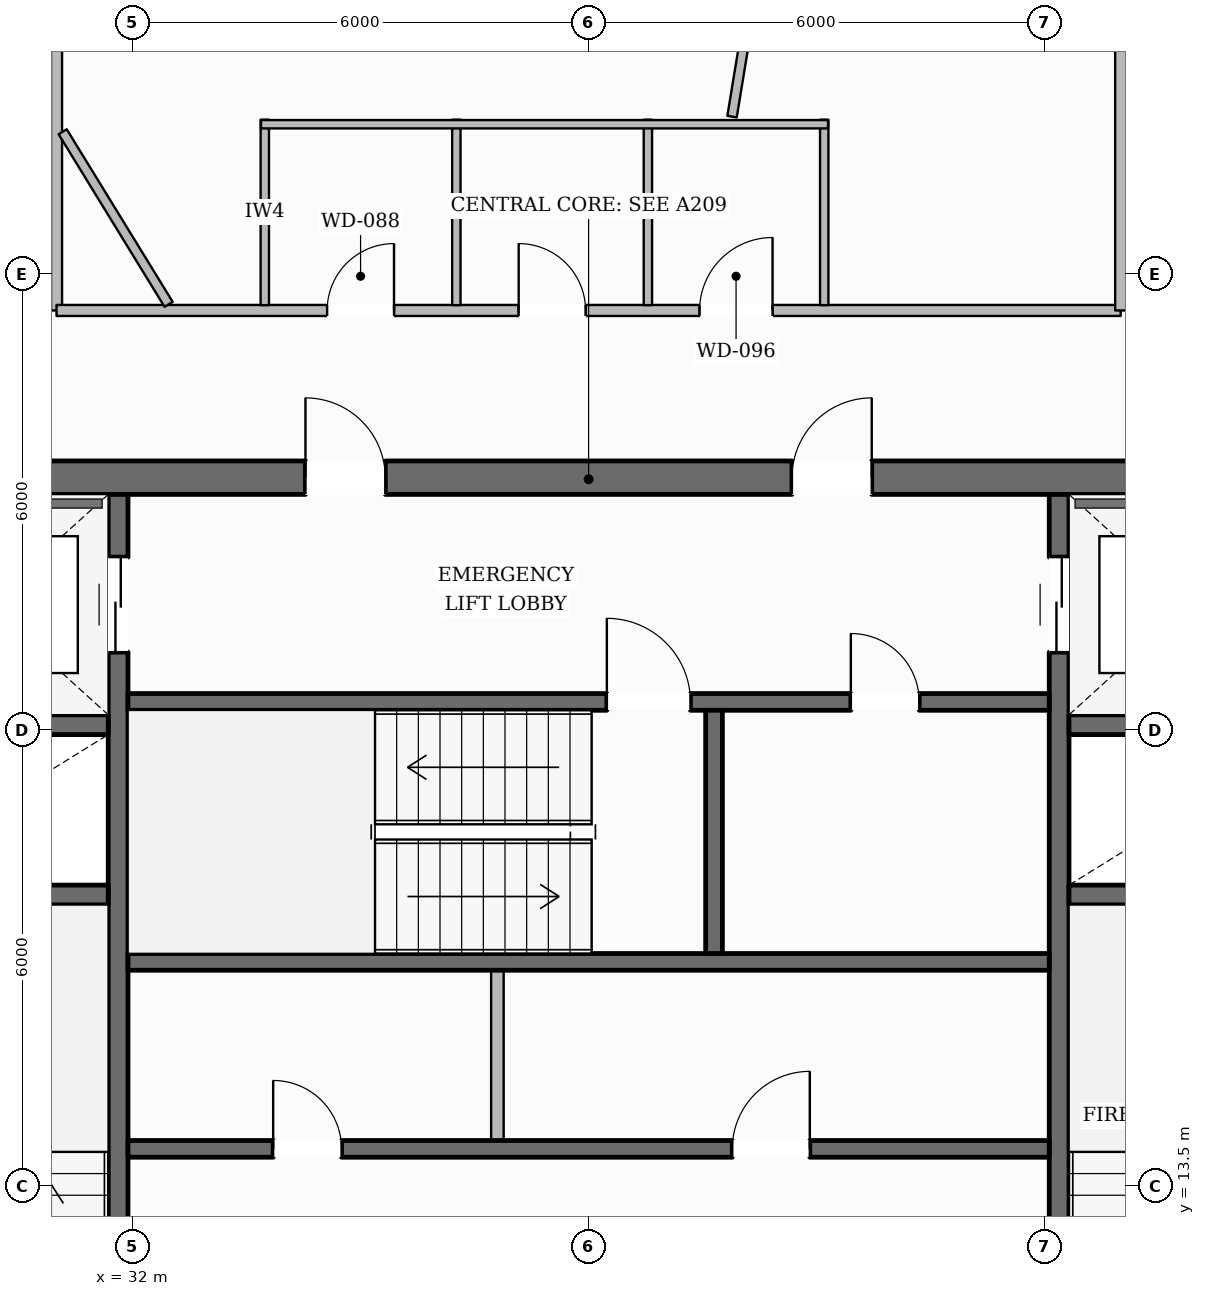
"""IFC4 building model, lengths in metres.
Left out: names, types, materials, properties, quantities, classifications, styles, units other than length and angle.
Written with IfcOpenShell. Run it as: python <this file> out.ifc"""

import sys

from ifc_helpers import new_model, si_unit, direction, frame, frame_2d, origin, place, context, subcontext, project, spatial, rectangle, extrude, element, fill, save


model = new_model("IFC4")
c1 = context("Model", 3, precision=1e-05, world=origin(), true_north=direction((0.0, 1.0)))
c2 = subcontext(c1, "Body", "Model", "MODEL_VIEW")
j1 = project(units=[si_unit("LENGTHUNIT", "METRE"), si_unit("PLANEANGLEUNIT", "RADIAN")], contexts=[c1])
p1 = place(None, origin())
s1 = spatial("IfcSite", under=j1, at=p1, CompositionType="ELEMENT")
p2 = place(p1, origin())
s2 = spatial("IfcBuilding", under=s1, at=p2, CompositionType="ELEMENT")
p3 = place(p2, frame((0.0, 0.0, 191.95)))
s3 = spatial("IfcBuildingStorey", under=s2, at=p3, CompositionType="ELEMENT", Elevation=191.95)
p4 = place(p3, frame((28.04, 22.82, 0.0), z_axis=(0.0, 0.0, 1.0), x_axis=(1.0, 0.0, 0.0)))
e1 = element("IfcWall", 1, at=p4, inside=s3, PredefinedType="SOLIDWALL", context=c2, shape_type="SweptSolid", body=[
    extrude(rectangle(XDim=19.92, YDim=0.44, at=frame_2d((9.96, 0.0))), origin(), (0.0, 0.0, 1.0), 3.6),
])
p5 = place(p4, frame((6.235, 0.0, 0.0)))
e2 = element("IfcOpeningElement", 2, at=p5, cuts=e1, PredefinedType="OPENING", context=c2, shape_type="SweptSolid", body=[
    extrude(rectangle(XDim=1.05, YDim=2.15, at=frame_2d((0.525, 1.075))), frame((0.0, 0.23, 0.0), z_axis=(0.0, -1.0, 0.0), x_axis=(1.0, 0.0, 0.0)), (0.0, 0.0, 1.0), 0.46),
])
p6 = place(p4, frame((12.635, 0.0, 0.0)))
e3 = element("IfcOpeningElement", 3, at=p6, cuts=e1, PredefinedType="OPENING", context=c2, shape_type="SweptSolid", body=[
    extrude(rectangle(XDim=1.05, YDim=2.15, at=frame_2d((0.525, 1.075))), frame((0.0, 0.23, 0.0), z_axis=(0.0, -1.0, 0.0), x_axis=(1.0, 0.0, 0.0)), (0.0, 0.0, 1.0), 0.46),
])
p7 = place(p3, frame((31.81, 9.6, 0.0), z_axis=(0.0, 0.0, 1.0), x_axis=(0.0, 1.0, 0.0)))
e4 = element("IfcWall", 4, at=p7, inside=s3, PredefinedType="SHEAR", context=c2, shape_type="SweptSolid", body=[
    extrude(rectangle(XDim=13.0, YDim=0.26, at=frame_2d((6.5, 0.0))), origin(), (0.0, 0.0, 1.0), 3.6),
])
p8 = place(p7, frame((10.925, 0.0, 0.0)))
e5 = element("IfcOpeningElement", 5, at=p8, cuts=e4, PredefinedType="OPENING", context=c2, shape_type="SweptSolid", body=[
    extrude(rectangle(XDim=1.25, YDim=2.25, at=frame_2d((0.625, 1.125))), frame((0.0, 0.14, 0.0), z_axis=(0.0, -1.0, 0.0), x_axis=(1.0, 0.0, 0.0)), (0.0, 0.0, 1.0), 0.28),
])
p9 = place(p3, frame((44.19, 9.6, 0.0), z_axis=(0.0, 0.0, 1.0), x_axis=(0.0, 1.0, 0.0)))
e6 = element("IfcWall", 6, at=p9, inside=s3, PredefinedType="SHEAR", context=c2, shape_type="SweptSolid", body=[
    extrude(rectangle(XDim=13.0, YDim=0.26, at=frame_2d((6.5, 0.0))), origin(), (0.0, 0.0, 1.0), 3.6),
])
p10 = place(p9, frame((10.925, 0.0, 0.0)))
e7 = element("IfcOpeningElement", 7, at=p10, cuts=e6, PredefinedType="OPENING", context=c2, shape_type="SweptSolid", body=[
    extrude(rectangle(XDim=1.25, YDim=2.25, at=frame_2d((0.625, 1.125))), frame((0.0, 0.14, 0.0), z_axis=(0.0, -1.0, 0.0), x_axis=(1.0, 0.0, 0.0)), (0.0, 0.0, 1.0), 0.28),
])
for number, where, z_axis, x_axis in (
    (8, (28.48, 17.33, 0.0), (0.0, 0.0, 1.0), (1.0, 0.0, 0.0)),
    (9, (28.48, 19.57, 0.0), (0.0, 0.0, 1.0), (1.0, 0.0, 0.0)),
    (10, (44.32, 17.33, 0.0), (0.0, 0.0, 1.0), (1.0, 0.0, 0.0)),
    (11, (44.32, 19.57, 0.0), (0.0, 0.0, 1.0), (1.0, 0.0, 0.0)),
):
    element("IfcWall", number, at=place(p3, frame(where, z_axis=z_axis, x_axis=x_axis)), inside=s3, PredefinedType="SHEAR", context=c2, shape_type="SweptSolid", body=[
        extrude(rectangle(XDim=3.2, YDim=0.26, at=frame_2d((1.6, 0.0))), origin(), (0.0, 0.0, 1.0), 3.6),
    ])
p11 = place(p3, frame((31.94, 19.87, 0.0), z_axis=(0.0, 0.0, 1.0), x_axis=(1.0, 0.0, 0.0)))
e12 = element("IfcWall", 12, at=p11, inside=s3, PredefinedType="SOLIDWALL", context=c2, shape_type="SweptSolid", body=[
    extrude(rectangle(XDim=12.12, YDim=0.22, at=frame_2d((6.06, 0.0))), origin(), (0.0, 0.0, 1.0), 3.6),
])
p12 = place(p11, frame((6.3, 0.0, 0.0)))
e13 = element("IfcOpeningElement", 13, at=p12, cuts=e12, PredefinedType="OPENING", context=c2, shape_type="SweptSolid", body=[
    extrude(rectangle(XDim=1.1, YDim=2.15, at=frame_2d((0.55, 1.075))), frame((0.0, 0.12, 0.0), z_axis=(0.0, -1.0, 0.0), x_axis=(1.0, 0.0, 0.0)), (0.0, 0.0, 1.0), 0.24),
])
p13 = place(p11, frame((9.51, 0.0, 0.0)))
e14 = element("IfcOpeningElement", 14, at=p13, cuts=e12, PredefinedType="OPENING", context=c2, shape_type="SweptSolid", body=[
    extrude(rectangle(XDim=0.9, YDim=2.1, at=frame_2d((0.45, 1.05))), frame((0.0, 0.12, 0.0), z_axis=(0.0, -1.0, 0.0), x_axis=(1.0, 0.0, 0.0)), (0.0, 0.0, 1.0), 0.24),
])
p14 = place(p3, frame((31.94, 16.45, 0.0), z_axis=(0.0, 0.0, 1.0), x_axis=(1.0, 0.0, 0.0)))
e15 = element("IfcWall", 15, at=p14, inside=s3, PredefinedType="SOLIDWALL", context=c2, shape_type="SweptSolid", body=[
    extrude(rectangle(XDim=12.12, YDim=0.22, at=frame_2d((6.06, 0.0))), origin(), (0.0, 0.0, 1.0), 3.6),
])
p15 = place(p3, frame((39.65, 16.56, 0.0), z_axis=(0.0, 0.0, 1.0), x_axis=(0.0, 1.0, 0.0)))
e16 = element("IfcWall", 16, at=p15, inside=s3, PredefinedType="SOLIDWALL", context=c2, shape_type="SweptSolid", body=[
    extrude(rectangle(XDim=3.2, YDim=0.22, at=frame_2d((1.6, 0.0))), origin(), (0.0, 0.0, 1.0), 3.6),
])
p16 = place(p3, frame((31.94, 13.99, 0.0), z_axis=(0.0, 0.0, 1.0), x_axis=(1.0, 0.0, 0.0)))
e17 = element("IfcWall", 17, at=p16, inside=s3, PredefinedType="SOLIDWALL", context=c2, shape_type="SweptSolid", body=[
    extrude(rectangle(XDim=12.12, YDim=0.22, at=frame_2d((6.06, 0.0))), origin(), (0.0, 0.0, 1.0), 3.6),
])
p17 = place(p16, frame((1.91, 0.0, 0.0)))
e18 = element("IfcOpeningElement", 18, at=p17, cuts=e17, PredefinedType="OPENING", context=c2, shape_type="SweptSolid", body=[
    extrude(rectangle(XDim=0.9, YDim=2.1, at=frame_2d((0.45, 1.05))), frame((0.0, 0.12, 0.0), z_axis=(0.0, -1.0, 0.0), x_axis=(1.0, 0.0, 0.0)), (0.0, 0.0, 1.0), 0.24),
])
p18 = place(p16, frame((7.95, 0.0, 0.0)))
e19 = element("IfcOpeningElement", 19, at=p18, cuts=e17, PredefinedType="OPENING", context=c2, shape_type="SweptSolid", body=[
    extrude(rectangle(XDim=1.02, YDim=2.15, at=frame_2d((0.51, 1.075))), frame((0.0, 0.12, 0.0), z_axis=(0.0, -1.0, 0.0), x_axis=(1.0, 0.0, 0.0)), (0.0, 0.0, 1.0), 0.24),
])
p19 = place(p3, frame((14.94, 11.763, 0.0), z_axis=(0.0, 0.0, 1.0), x_axis=(0.498943522518, 0.866634502739, 0.0)))
e20 = element("IfcWall", 20, at=p19, inside=s3, PredefinedType="STANDARD", context=c2, shape_type="SweptSolid", body=[
    extrude(rectangle(XDim=37.445, YDim=0.35, at=frame_2d((18.723, 0.0))), origin(), (0.0, 0.0, 1.0), 3.132),
])
p20 = place(p19, frame((27.484, 0.0, 0.0)))
e21 = element("IfcOpeningElement", 21, at=p20, cuts=e20, PredefinedType="OPENING", context=c2, shape_type="SweptSolid", body=[
    extrude(rectangle(XDim=1.0, YDim=2.2, at=frame_2d((0.5, 1.1))), frame((0.0, 0.185, 0.0), z_axis=(0.0, -1.0, 0.0), x_axis=(1.0, 0.0, 0.0)), (0.0, 0.0, 1.0), 0.37),
])
p21 = place(p19, frame((33.2, 0.0, 0.65)))
e22 = element("IfcOpeningElement", 22, at=p21, cuts=e20, PredefinedType="OPENING", context=c2, shape_type="SweptSolid", body=[
    extrude(rectangle(XDim=1.45, YDim=1.75, at=frame_2d((0.725, 0.875))), frame((0.0, 0.185, 0.0), z_axis=(0.0, -1.0, 0.0), x_axis=(1.0, 0.0, 0.0)), (0.0, 0.0, 1.0), 0.37),
])
p22 = place(p19, frame((21.038, 0.0, 0.65)))
e23 = element("IfcOpeningElement", 23, at=p22, cuts=e20, PredefinedType="OPENING", context=c2, shape_type="SweptSolid", body=[
    extrude(rectangle(XDim=1.45, YDim=1.75, at=frame_2d((0.725, 0.875))), frame((0.0, 0.185, 0.0), z_axis=(0.0, -1.0, 0.0), x_axis=(1.0, 0.0, 0.0)), (0.0, 0.0, 1.0), 0.37),
])
p23 = place(p19, frame((8.875, 0.0, 0.65)))
e24 = element("IfcOpeningElement", 24, at=p23, cuts=e20, PredefinedType="OPENING", context=c2, shape_type="SweptSolid", body=[
    extrude(rectangle(XDim=1.45, YDim=1.75, at=frame_2d((0.725, 0.875))), frame((0.0, 0.185, 0.0), z_axis=(0.0, -1.0, 0.0), x_axis=(1.0, 0.0, 0.0)), (0.0, 0.0, 1.0), 0.37),
])
p24 = place(p19, frame((2.795, 0.0, 0.65)))
e25 = element("IfcOpeningElement", 25, at=p24, cuts=e20, PredefinedType="OPENING", context=c2, shape_type="SweptSolid", body=[
    extrude(rectangle(XDim=1.45, YDim=1.75, at=frame_2d((0.725, 0.875))), frame((0.0, 0.185, 0.0), z_axis=(0.0, -1.0, 0.0), x_axis=(1.0, 0.0, 0.0)), (0.0, 0.0, 1.0), 0.37),
])
p25 = place(p3, frame((42.516, 44.131, 0.0), z_axis=(0.0, 0.0, 1.0), x_axis=(0.506310158323, -0.862351450152, 0.0)))
e26 = element("IfcWall", 26, at=p25, inside=s3, PredefinedType="STANDARD", context=c2, shape_type="SweptSolid", body=[
    extrude(rectangle(XDim=38.0, YDim=0.35, at=frame_2d((19.0, 0.0))), origin(), (0.0, 0.0, 1.0), 3.132),
])
p26 = place(p25, frame((33.708, 0.0, 0.65)))
e27 = element("IfcOpeningElement", 27, at=p26, cuts=e26, PredefinedType="OPENING", context=c2, shape_type="SweptSolid", body=[
    extrude(rectangle(XDim=1.45, YDim=1.75, at=frame_2d((0.725, 0.875))), frame((0.0, 0.185, 0.0), z_axis=(0.0, -1.0, 0.0), x_axis=(1.0, 0.0, 0.0)), (0.0, 0.0, 1.0), 0.37),
])
p27 = place(p25, frame((27.534, 0.0, 0.65)))
e28 = element("IfcOpeningElement", 28, at=p27, cuts=e26, PredefinedType="OPENING", context=c2, shape_type="SweptSolid", body=[
    extrude(rectangle(XDim=1.45, YDim=1.75, at=frame_2d((0.725, 0.875))), frame((0.0, 0.185, 0.0), z_axis=(0.0, -1.0, 0.0), x_axis=(1.0, 0.0, 0.0)), (0.0, 0.0, 1.0), 0.37),
])
p28 = place(p25, frame((21.359, 0.0, 0.65)))
e29 = element("IfcOpeningElement", 29, at=p28, cuts=e26, PredefinedType="OPENING", context=c2, shape_type="SweptSolid", body=[
    extrude(rectangle(XDim=1.45, YDim=1.75, at=frame_2d((0.725, 0.875))), frame((0.0, 0.185, 0.0), z_axis=(0.0, -1.0, 0.0), x_axis=(1.0, 0.0, 0.0)), (0.0, 0.0, 1.0), 0.37),
])
p29 = place(p25, frame((9.009, 0.0, 0.65)))
e30 = element("IfcOpeningElement", 30, at=p29, cuts=e26, PredefinedType="OPENING", context=c2, shape_type="SweptSolid", body=[
    extrude(rectangle(XDim=1.45, YDim=1.75, at=frame_2d((0.725, 0.875))), frame((0.0, 0.185, 0.0), z_axis=(0.0, -1.0, 0.0), x_axis=(1.0, 0.0, 0.0)), (0.0, 0.0, 1.0), 0.37),
])
p30 = place(p25, frame((2.834, 0.0, 0.65)))
e31 = element("IfcOpeningElement", 31, at=p30, cuts=e26, PredefinedType="OPENING", context=c2, shape_type="SweptSolid", body=[
    extrude(rectangle(XDim=1.45, YDim=1.75, at=frame_2d((0.725, 0.875))), frame((0.0, 0.185, 0.0), z_axis=(0.0, -1.0, 0.0), x_axis=(1.0, 0.0, 0.0)), (0.0, 0.0, 1.0), 0.37),
])
p31 = place(p3, frame((36.8, 14.1, 0.0), z_axis=(0.0, 0.0, 1.0), x_axis=(0.0, 1.0, 0.0)))
e32 = element("IfcWall", 32, at=p31, inside=s3, PredefinedType="PARTITIONING", context=c2, shape_type="SweptSolid", body=[
    extrude(rectangle(XDim=2.24, YDim=0.165, at=frame_2d((1.12, 0.0))), origin(), (0.0, 0.0, 1.0), 3.6),
])
p32 = place(p3, frame((31.0, 33.525, 0.0), z_axis=(0.0, 0.0, 1.0), x_axis=(0.0, -1.0, 0.0)))
e33 = element("IfcWall", 33, at=p32, inside=s3, PredefinedType="PARTITIONING", context=c2, shape_type="SweptSolid", body=[
    extrude(rectangle(XDim=8.505, YDim=0.145, at=frame_2d((4.253, 0.0))), origin(), (0.0, 0.0, 1.0), 3.6),
])
p33 = place(p32, frame((2.402, 0.0, 0.0)))
e34 = element("IfcOpeningElement", 34, at=p33, cuts=e33, PredefinedType="OPENING", context=c2, shape_type="SweptSolid", body=[
    extrude(rectangle(XDim=1.4, YDim=2.2, at=frame_2d((0.7, 1.1))), frame((0.0, 0.083, 0.0), z_axis=(0.0, -1.0, 0.0), x_axis=(1.0, 0.0, 0.0)), (0.0, 0.0, 1.0), 0.165),
])
p34 = place(p3, frame((31.0, 25.02, 0.0), z_axis=(0.0, 0.0, 1.0), x_axis=(1.0, 0.0, 0.0)))
e35 = element("IfcWall", 35, at=p34, inside=s3, PredefinedType="PARTITIONING", context=c2, shape_type="SweptSolid", body=[
    extrude(rectangle(XDim=14.0, YDim=0.145, at=frame_2d((7.0, 0.0))), origin(), (0.0, 0.0, 1.0), 3.6),
])
p35 = place(p34, frame((3.56, 0.0, 0.0)))
e36 = element("IfcOpeningElement", 36, at=p35, cuts=e35, PredefinedType="OPENING", context=c2, shape_type="SweptSolid", body=[
    extrude(rectangle(XDim=0.88, YDim=2.1, at=frame_2d((0.44, 1.05))), frame((0.0, 0.083, 0.0), z_axis=(0.0, -1.0, 0.0), x_axis=(1.0, 0.0, 0.0)), (0.0, 0.0, 1.0), 0.165),
])
p36 = place(p34, frame((6.08, 0.0, 0.0)))
e37 = element("IfcOpeningElement", 37, at=p36, cuts=e35, PredefinedType="OPENING", context=c2, shape_type="SweptSolid", body=[
    extrude(rectangle(XDim=0.88, YDim=2.1, at=frame_2d((0.44, 1.05))), frame((0.0, 0.083, 0.0), z_axis=(0.0, -1.0, 0.0), x_axis=(1.0, 0.0, 0.0)), (0.0, 0.0, 1.0), 0.165),
])
p37 = place(p34, frame((8.46, 0.0, 0.0)))
e38 = element("IfcOpeningElement", 38, at=p37, cuts=e35, PredefinedType="OPENING", context=c2, shape_type="SweptSolid", body=[
    extrude(rectangle(XDim=0.96, YDim=2.1, at=frame_2d((0.48, 1.05))), frame((0.0, 0.083, 0.0), z_axis=(0.0, -1.0, 0.0), x_axis=(1.0, 0.0, 0.0)), (0.0, 0.0, 1.0), 0.165),
])
p38 = place(p3, frame((45.0, 25.02, 0.0), z_axis=(0.0, 0.0, 1.0), x_axis=(0.0, 1.0, 0.0)))
e39 = element("IfcWall", 39, at=p38, inside=s3, PredefinedType="PARTITIONING", context=c2, shape_type="SweptSolid", body=[
    extrude(rectangle(XDim=8.837, YDim=0.145, at=frame_2d((4.418, 0.0))), origin(), (0.0, 0.0, 1.0), 3.6),
])
p39 = place(p38, frame((3.718, 0.0, 0.0)))
e40 = element("IfcOpeningElement", 40, at=p39, cuts=e39, PredefinedType="OPENING", context=c2, shape_type="SweptSolid", body=[
    extrude(rectangle(XDim=1.4, YDim=2.2, at=frame_2d((0.7, 1.1))), frame((0.0, 0.083, 0.0), z_axis=(0.0, -1.0, 0.0), x_axis=(1.0, 0.0, 0.0)), (0.0, 0.0, 1.0), 0.165),
])
p40 = place(p3, frame((33.74, 25.09, 0.0), z_axis=(0.0, 0.0, 1.0), x_axis=(0.0, 1.0, 0.0)))
e41 = element("IfcWall", 41, at=p40, inside=s3, PredefinedType="PLUMBINGWALL", context=c2, shape_type="SweptSolid", body=[
    extrude(rectangle(XDim=2.44, YDim=0.11, at=frame_2d((1.22, 0.0))), origin(), (0.0, 0.0, 1.0), 3.141),
])
for number, where, z_axis, x_axis in (
    (42, (36.26, 25.09, 0.0), (0.0, 0.0, 1.0), (0.0, 1.0, 0.0)),
    (43, (38.78, 25.09, 0.0), (0.0, 0.0, 1.0), (0.0, 1.0, 0.0)),
    (44, (41.1, 25.09, 0.0), (0.0, 0.0, 1.0), (0.0, 1.0, 0.0)),
):
    element("IfcWall", number, at=place(p3, frame(where, z_axis=z_axis, x_axis=x_axis)), inside=s3, PredefinedType="PLUMBINGWALL", context=c2, shape_type="SweptSolid", body=[
        extrude(rectangle(XDim=2.44, YDim=0.11, at=frame_2d((1.22, 0.0))), origin(), (0.0, 0.0, 1.0), 3.6),
    ])
p41 = place(p3, frame((33.69, 27.47, 0.0), z_axis=(0.0, 0.0, 1.0), x_axis=(1.0, 0.0, 0.0)))
e45 = element("IfcWall", 45, at=p41, inside=s3, PredefinedType="PLUMBINGWALL", context=c2, shape_type="SweptSolid", body=[
    extrude(rectangle(XDim=7.46, YDim=0.11, at=frame_2d((3.73, 0.0))), origin(), (0.0, 0.0, 1.0), 3.6),
])
p42 = place(p3, frame((39.887, 27.57, 0.0), z_axis=(0.0, 0.0, 1.0), x_axis=(0.162334640523, 0.986735762241, 0.0)))
e46 = element("IfcWall", 46, at=p42, inside=s3, PredefinedType="PARTITIONING", context=c2, shape_type="SweptSolid", body=[
    extrude(rectangle(XDim=15.921, YDim=0.125, at=frame_2d((7.96, 0.0))), origin(), (0.0, 0.0, 1.0), 3.141),
])
p43 = place(p3, frame((32.475, 25.101, 0.0), z_axis=(0.0, 0.0, 1.0), x_axis=(-0.52318715373, 0.852217813808, 0.0)))
e47 = element("IfcWall", 47, at=p43, inside=s3, PredefinedType="PARTITIONING", context=c2, shape_type="SweptSolid", body=[
    extrude(rectangle(XDim=2.665, YDim=0.125, at=frame_2d((1.332, 0.0))), origin(), (0.0, 0.0, 1.0), 3.6),
])
p44 = place(p12, origin())
e48 = element("IfcDoor", 48, at=p44, inside=s3, OperationType="SINGLE_SWING_LEFT", PredefinedType="DOOR", context=c2, shape_type="SweptSolid", body=[
    extrude(rectangle(XDim=1.1, YDim=2.15, at=frame_2d((0.55, 1.075))), frame((0.0, 0.025, 0.0), z_axis=(0.0, -1.0, 0.0), x_axis=(1.0, 0.0, 0.0)), (0.0, 0.0, 1.0), 0.05),
])
fill(e13, e48)
p45 = place(p5, origin())
e49 = element("IfcDoor", 49, at=p45, inside=s3, OperationType="SINGLE_SWING_LEFT", PredefinedType="DOOR", context=c2, shape_type="SweptSolid", body=[
    extrude(rectangle(XDim=1.05, YDim=2.15, at=frame_2d((0.525, 1.075))), frame((0.0, 0.025, 0.0), z_axis=(0.0, -1.0, 0.0), x_axis=(1.0, 0.0, 0.0)), (0.0, 0.0, 1.0), 0.05),
])
fill(e2, e49)
p46 = place(p6, origin())
e50 = element("IfcDoor", 50, at=p46, inside=s3, OperationType="SINGLE_SWING_RIGHT", PredefinedType="DOOR", context=c2, shape_type="SweptSolid", body=[
    extrude(rectangle(XDim=1.05, YDim=2.15, at=frame_2d((0.525, 1.075))), frame((0.0, 0.025, 0.0), z_axis=(0.0, -1.0, 0.0), x_axis=(1.0, 0.0, 0.0)), (0.0, 0.0, 1.0), 0.05),
])
fill(e3, e50)
p47 = place(p8, origin())
e51 = element("IfcDoor", 51, at=p47, inside=s3, OperationType="DOUBLE_DOOR_SLIDING", PredefinedType="DOOR", context=c2, shape_type="SweptSolid", body=[
    extrude(rectangle(XDim=1.25, YDim=2.25, at=frame_2d((0.625, 1.125))), frame((0.0, 0.025, 0.0), z_axis=(0.0, -1.0, 0.0), x_axis=(1.0, 0.0, 0.0)), (0.0, 0.0, 1.0), 0.05),
])
fill(e5, e51)
p48 = place(p10, origin())
e52 = element("IfcDoor", 52, at=p48, inside=s3, OperationType="DOUBLE_DOOR_SLIDING", PredefinedType="DOOR", context=c2, shape_type="SweptSolid", body=[
    extrude(rectangle(XDim=1.25, YDim=2.25, at=frame_2d((0.625, 1.125))), frame((0.0, 0.025, 0.0), z_axis=(0.0, -1.0, 0.0), x_axis=(1.0, 0.0, 0.0)), (0.0, 0.0, 1.0), 0.05),
])
fill(e7, e52)
p49 = place(p17, origin())
e53 = element("IfcDoor", 53, at=p49, inside=s3, OperationType="SINGLE_SWING_LEFT", PredefinedType="DOOR", context=c2, shape_type="SweptSolid", body=[
    extrude(rectangle(XDim=0.9, YDim=2.1, at=frame_2d((0.45, 1.05))), frame((0.0, 0.025, 0.0), z_axis=(0.0, -1.0, 0.0), x_axis=(1.0, 0.0, 0.0)), (0.0, 0.0, 1.0), 0.05),
])
fill(e18, e53)
p50 = place(p18, origin())
e54 = element("IfcDoor", 54, at=p50, inside=s3, OperationType="SINGLE_SWING_RIGHT", PredefinedType="DOOR", context=c2, shape_type="SweptSolid", body=[
    extrude(rectangle(XDim=1.02, YDim=2.15, at=frame_2d((0.51, 1.075))), frame((0.0, 0.025, 0.0), z_axis=(0.0, -1.0, 0.0), x_axis=(1.0, 0.0, 0.0)), (0.0, 0.0, 1.0), 0.05),
])
fill(e19, e54)
p51 = place(p13, origin())
e55 = element("IfcDoor", 55, at=p51, inside=s3, OperationType="SINGLE_SWING_LEFT", PredefinedType="DOOR", context=c2, shape_type="SweptSolid", body=[
    extrude(rectangle(XDim=0.9, YDim=2.1, at=frame_2d((0.45, 1.05))), frame((0.0, 0.025, 0.0), z_axis=(0.0, -1.0, 0.0), x_axis=(1.0, 0.0, 0.0)), (0.0, 0.0, 1.0), 0.05),
])
fill(e14, e55)
p52 = place(p35, origin())
e56 = element("IfcDoor", 56, at=p52, inside=s3, OperationType="SINGLE_SWING_RIGHT", PredefinedType="DOOR", context=c2, shape_type="SweptSolid", body=[
    extrude(rectangle(XDim=0.88, YDim=2.1, at=frame_2d((0.44, 1.05))), frame((0.0, 0.025, 0.0), z_axis=(0.0, -1.0, 0.0), x_axis=(1.0, 0.0, 0.0)), (0.0, 0.0, 1.0), 0.05),
])
fill(e36, e56)
p53 = place(p36, origin())
e57 = element("IfcDoor", 57, at=p53, inside=s3, OperationType="SINGLE_SWING_LEFT", PredefinedType="DOOR", context=c2, shape_type="SweptSolid", body=[
    extrude(rectangle(XDim=0.88, YDim=2.1, at=frame_2d((0.44, 1.05))), frame((0.0, 0.025, 0.0), z_axis=(0.0, -1.0, 0.0), x_axis=(1.0, 0.0, 0.0)), (0.0, 0.0, 1.0), 0.05),
])
fill(e37, e57)
p54 = place(p37, origin())
e58 = element("IfcDoor", 58, at=p54, inside=s3, OperationType="SINGLE_SWING_RIGHT", PredefinedType="DOOR", context=c2, shape_type="SweptSolid", body=[
    extrude(rectangle(XDim=0.96, YDim=2.1, at=frame_2d((0.48, 1.05))), frame((0.0, 0.025, 0.0), z_axis=(0.0, -1.0, 0.0), x_axis=(1.0, 0.0, 0.0)), (0.0, 0.0, 1.0), 0.05),
])
fill(e38, e58)
save(model, sys.argv[1])
